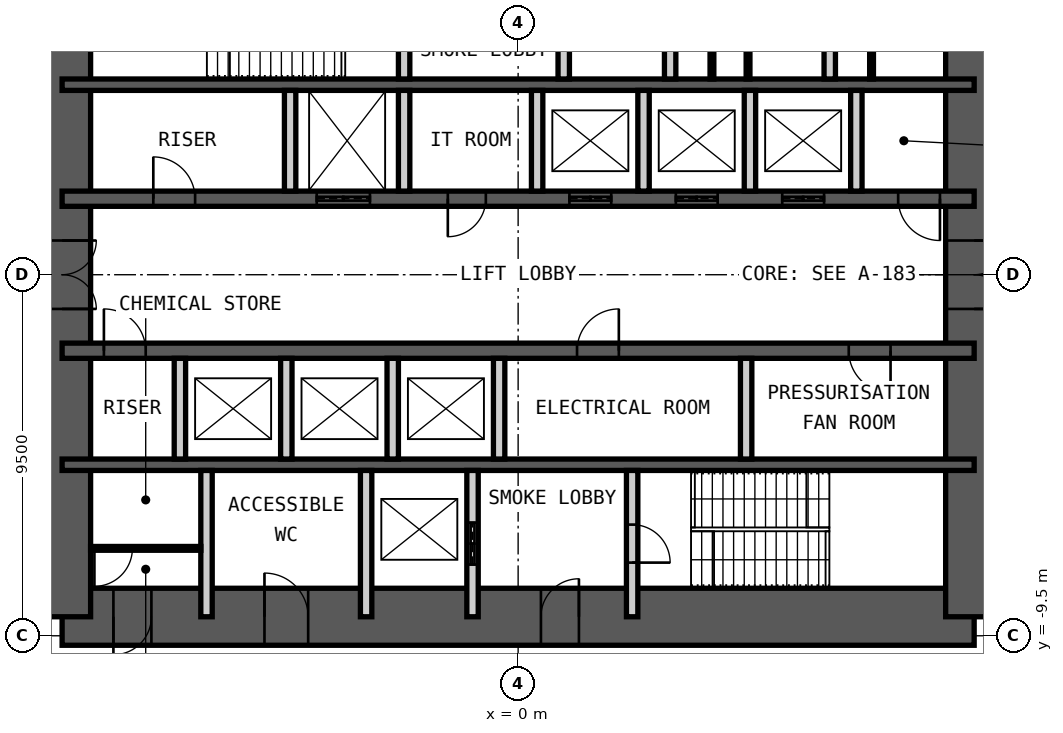
"""IFC4 building model, lengths in metres.
Left out: names, types, materials, properties, quantities, classifications, styles, units other than length and angle.
Written with IfcOpenShell. Run it as: python <this file> out.ifc"""

import sys

from ifc_helpers import new_model, si_unit, direction, frame, frame_2d, origin, place, context, subcontext, project, spatial, rectangle, extrude, element, fill, save


model = new_model("IFC4")
c1 = context("Model", 3, precision=1e-05, world=origin(), true_north=direction((0.0, 1.0)))
c2 = subcontext(c1, "Body", "Model", "MODEL_VIEW")
j1 = project(units=[si_unit("LENGTHUNIT", "METRE"), si_unit("PLANEANGLEUNIT", "RADIAN")], contexts=[c1])
p1 = place(None, origin())
s1 = spatial("IfcSite", under=j1, at=p1, CompositionType="ELEMENT")
p2 = place(p1, origin())
s2 = spatial("IfcBuilding", under=s1, at=p2, CompositionType="ELEMENT")
p3 = place(p2, frame((0.0, 0.0, 32.0)))
s3 = spatial("IfcBuildingStorey", under=s2, at=p3, CompositionType="ELEMENT", Elevation=32.0)
p4 = place(p3, frame((-12.0, -9.0, 0.0), z_axis=(0.0, 0.0, 1.0), x_axis=(1.0, 0.0, 0.0)))
e1 = element("IfcWall", 1, at=p4, inside=s3, PredefinedType="SHEAR", context=c2, shape_type="SweptSolid", body=[
    extrude(rectangle(XDim=24.0, YDim=1.5, at=frame_2d((12.0, 0.0))), origin(), (0.0, 0.0, 1.0), 5.0),
])
p5 = place(p4, frame((1.35, 0.0, 0.0)))
e2 = element("IfcOpeningElement", 2, at=p5, cuts=e1, PredefinedType="OPENING", context=c2, shape_type="SweptSolid", body=[
    extrude(rectangle(XDim=1.0, YDim=2.1, at=frame_2d((0.5, 1.05))), frame((0.0, 0.76, 0.0), z_axis=(0.0, -1.0, 0.0), x_axis=(1.0, 0.0, 0.0)), (0.0, 0.0, 1.0), 1.52),
])
p6 = place(p4, frame((5.325, 0.0, 0.0)))
e3 = element("IfcOpeningElement", 3, at=p6, cuts=e1, PredefinedType="OPENING", context=c2, shape_type="SweptSolid", body=[
    extrude(rectangle(XDim=1.15, YDim=2.1, at=frame_2d((0.575, 1.05))), frame((0.0, 0.76, 0.0), z_axis=(0.0, -1.0, 0.0), x_axis=(1.0, 0.0, 0.0)), (0.0, 0.0, 1.0), 1.52),
])
p7 = place(p4, frame((12.6, 0.0, 0.0)))
e4 = element("IfcOpeningElement", 4, at=p7, cuts=e1, PredefinedType="OPENING", context=c2, shape_type="SweptSolid", body=[
    extrude(rectangle(XDim=1.0, YDim=2.1, at=frame_2d((0.5, 1.05))), frame((0.0, 0.76, 0.0), z_axis=(0.0, -1.0, 0.0), x_axis=(1.0, 0.0, 0.0)), (0.0, 0.0, 1.0), 1.52),
])
p8 = place(p3, frame((12.0, -9.0, 0.0), z_axis=(0.0, 0.0, 1.0), x_axis=(0.0, 1.0, 0.0)))
e5 = element("IfcWall", 5, at=p8, inside=s3, PredefinedType="SHEAR", context=c2, shape_type="SweptSolid", body=[
    extrude(rectangle(XDim=18.0, YDim=1.5, at=frame_2d((9.0, 0.0))), origin(), (0.0, 0.0, 1.0), 5.0),
])
p9 = place(p8, frame((8.1, 0.0, 0.0)))
e6 = element("IfcOpeningElement", 6, at=p9, cuts=e5, PredefinedType="OPENING", context=c2, shape_type="SweptSolid", body=[
    extrude(rectangle(XDim=1.8, YDim=2.1, at=frame_2d((0.9, 1.05))), frame((0.0, 0.76, 0.0), z_axis=(0.0, -1.0, 0.0), x_axis=(1.0, 0.0, 0.0)), (0.0, 0.0, 1.0), 1.52),
])
p10 = place(p3, frame((-12.0, -9.0, 0.0), z_axis=(0.0, 0.0, 1.0), x_axis=(0.0, 1.0, 0.0)))
e7 = element("IfcWall", 7, at=p10, inside=s3, PredefinedType="SHEAR", context=c2, shape_type="SweptSolid", body=[
    extrude(rectangle(XDim=18.0, YDim=1.5, at=frame_2d((9.0, 0.0))), origin(), (0.0, 0.0, 1.0), 5.0),
])
p11 = place(p10, frame((8.1, 0.0, 0.0)))
e8 = element("IfcOpeningElement", 8, at=p11, cuts=e7, PredefinedType="OPENING", context=c2, shape_type="SweptSolid", body=[
    extrude(rectangle(XDim=1.8, YDim=2.1, at=frame_2d((0.9, 1.05))), frame((0.0, 0.76, 0.0), z_axis=(0.0, -1.0, 0.0), x_axis=(1.0, 0.0, 0.0)), (0.0, 0.0, 1.0), 1.52),
])
p12 = place(p3, frame((-12.0, 5.0, 0.0), z_axis=(0.0, 0.0, 1.0), x_axis=(1.0, 0.0, 0.0)))
e9 = element("IfcWall", 9, at=p12, inside=s3, PredefinedType="SHEAR", context=c2, shape_type="SweptSolid", body=[
    extrude(rectangle(XDim=24.0, YDim=0.3, at=frame_2d((12.0, 0.0))), origin(), (0.0, 0.0, 1.0), 5.0),
])
p13 = place(p3, frame((-12.0, 2.0, 0.0), z_axis=(0.0, 0.0, 1.0), x_axis=(1.0, 0.0, 0.0)))
e10 = element("IfcWall", 10, at=p13, inside=s3, PredefinedType="SHEAR", context=c2, shape_type="SweptSolid", body=[
    extrude(rectangle(XDim=24.0, YDim=0.4, at=frame_2d((12.0, 0.0))), origin(), (0.0, 0.0, 1.0), 5.0),
])
p14 = place(p13, frame((2.4, 0.0, 0.0)))
e11 = element("IfcOpeningElement", 11, at=p14, cuts=e10, PredefinedType="OPENING", context=c2, shape_type="SweptSolid", body=[
    extrude(rectangle(XDim=1.1, YDim=2.1, at=frame_2d((0.55, 1.05))), frame((0.0, 0.21, 0.0), z_axis=(0.0, -1.0, 0.0), x_axis=(1.0, 0.0, 0.0)), (0.0, 0.0, 1.0), 0.42),
])
p15 = place(p13, frame((22.0, 0.0, 0.0)))
e12 = element("IfcOpeningElement", 12, at=p15, cuts=e10, PredefinedType="OPENING", context=c2, shape_type="SweptSolid", body=[
    extrude(rectangle(XDim=1.1, YDim=2.1, at=frame_2d((0.55, 1.05))), frame((0.0, 0.21, 0.0), z_axis=(0.0, -1.0, 0.0), x_axis=(1.0, 0.0, 0.0)), (0.0, 0.0, 1.0), 0.42),
])
p16 = place(p13, frame((10.15, 0.0, 0.0)))
e13 = element("IfcOpeningElement", 13, at=p16, cuts=e10, PredefinedType="OPENING", context=c2, shape_type="SweptSolid", body=[
    extrude(rectangle(XDim=1.0, YDim=2.1, at=frame_2d((0.5, 1.05))), frame((0.0, 0.21, 0.0), z_axis=(0.0, -1.0, 0.0), x_axis=(1.0, 0.0, 0.0)), (0.0, 0.0, 1.0), 0.42),
])
p17 = place(p13, frame((6.7, 0.0, 0.0)))
e14 = element("IfcOpeningElement", 14, at=p17, cuts=e10, PredefinedType="OPENING", context=c2, shape_type="SweptSolid", body=[
    extrude(rectangle(XDim=1.4, YDim=2.4, at=frame_2d((0.7, 1.2))), frame((0.0, 0.21, 0.0), z_axis=(0.0, -1.0, 0.0), x_axis=(1.0, 0.0, 0.0)), (0.0, 0.0, 1.0), 0.42),
])
p18 = place(p13, frame((13.35, 0.0, 0.0)))
e15 = element("IfcOpeningElement", 15, at=p18, cuts=e10, PredefinedType="OPENING", context=c2, shape_type="SweptSolid", body=[
    extrude(rectangle(XDim=1.1, YDim=2.4, at=frame_2d((0.55, 1.2))), frame((0.0, 0.21, 0.0), z_axis=(0.0, -1.0, 0.0), x_axis=(1.0, 0.0, 0.0)), (0.0, 0.0, 1.0), 0.42),
])
p19 = place(p13, frame((16.15, 0.0, 0.0)))
e16 = element("IfcOpeningElement", 16, at=p19, cuts=e10, PredefinedType="OPENING", context=c2, shape_type="SweptSolid", body=[
    extrude(rectangle(XDim=1.1, YDim=2.4, at=frame_2d((0.55, 1.2))), frame((0.0, 0.21, 0.0), z_axis=(0.0, -1.0, 0.0), x_axis=(1.0, 0.0, 0.0)), (0.0, 0.0, 1.0), 0.42),
])
p20 = place(p13, frame((18.95, 0.0, 0.0)))
e17 = element("IfcOpeningElement", 17, at=p20, cuts=e10, PredefinedType="OPENING", context=c2, shape_type="SweptSolid", body=[
    extrude(rectangle(XDim=1.1, YDim=2.4, at=frame_2d((0.55, 1.2))), frame((0.0, 0.21, 0.0), z_axis=(0.0, -1.0, 0.0), x_axis=(1.0, 0.0, 0.0)), (0.0, 0.0, 1.0), 0.42),
])
p21 = place(p3, frame((-12.0, -2.0, 0.0), z_axis=(0.0, 0.0, 1.0), x_axis=(1.0, 0.0, 0.0)))
e18 = element("IfcWall", 18, at=p21, inside=s3, PredefinedType="SHEAR", context=c2, shape_type="SweptSolid", body=[
    extrude(rectangle(XDim=24.0, YDim=0.4, at=frame_2d((12.0, 0.0))), origin(), (0.0, 0.0, 1.0), 5.0),
])
p22 = place(p21, frame((1.1, 0.0, 0.0)))
e19 = element("IfcOpeningElement", 19, at=p22, cuts=e18, PredefinedType="OPENING", context=c2, shape_type="SweptSolid", body=[
    extrude(rectangle(XDim=1.1, YDim=2.1, at=frame_2d((0.55, 1.05))), frame((0.0, 0.21, 0.0), z_axis=(0.0, -1.0, 0.0), x_axis=(1.0, 0.0, 0.0)), (0.0, 0.0, 1.0), 0.42),
])
p23 = place(p21, frame((13.55, 0.0, 0.0)))
e20 = element("IfcOpeningElement", 20, at=p23, cuts=e18, PredefinedType="OPENING", context=c2, shape_type="SweptSolid", body=[
    extrude(rectangle(XDim=1.1, YDim=2.1, at=frame_2d((0.55, 1.05))), frame((0.0, 0.21, 0.0), z_axis=(0.0, -1.0, 0.0), x_axis=(1.0, 0.0, 0.0)), (0.0, 0.0, 1.0), 0.42),
])
p24 = place(p21, frame((20.7, 0.0, 0.0)))
e21 = element("IfcOpeningElement", 21, at=p24, cuts=e18, PredefinedType="OPENING", context=c2, shape_type="SweptSolid", body=[
    extrude(rectangle(XDim=1.1, YDim=2.1, at=frame_2d((0.55, 1.05))), frame((0.0, 0.21, 0.0), z_axis=(0.0, -1.0, 0.0), x_axis=(1.0, 0.0, 0.0)), (0.0, 0.0, 1.0), 0.42),
])
p25 = place(p3, frame((-12.0, -5.0, 0.0), z_axis=(0.0, 0.0, 1.0), x_axis=(1.0, 0.0, 0.0)))
e22 = element("IfcWall", 22, at=p25, inside=s3, PredefinedType="SHEAR", context=c2, shape_type="SweptSolid", body=[
    extrude(rectangle(XDim=24.0, YDim=0.3, at=frame_2d((12.0, 0.0))), origin(), (0.0, 0.0, 1.0), 5.0),
])
p26 = place(p3, frame((-3.0, 5.15, 0.0), z_axis=(0.0, 0.0, 1.0), x_axis=(0.0, 1.0, 0.0)))
e23 = element("IfcWall", 23, at=p26, inside=s3, PredefinedType="PARTITIONING", context=c2, shape_type="SweptSolid", body=[
    extrude(rectangle(XDim=3.85, YDim=0.3, at=frame_2d((1.925, 0.0))), origin(), (0.0, 0.0, 1.0), 4.78),
])
p27 = place(p26, frame((1.425, 0.0, 0.0)))
e24 = element("IfcOpeningElement", 24, at=p27, cuts=e23, PredefinedType="OPENING", context=c2, shape_type="SweptSolid", body=[
    extrude(rectangle(XDim=1.0, YDim=2.1, at=frame_2d((0.5, 1.05))), frame((0.0, 0.16, 0.0), z_axis=(0.0, -1.0, 0.0), x_axis=(1.0, 0.0, 0.0)), (0.0, 0.0, 1.0), 0.32),
])
p28 = place(p3, frame((1.2, 5.15, 0.0), z_axis=(0.0, 0.0, 1.0), x_axis=(0.0, 1.0, 0.0)))
e25 = element("IfcWall", 25, at=p28, inside=s3, PredefinedType="PARTITIONING", context=c2, shape_type="SweptSolid", body=[
    extrude(rectangle(XDim=3.85, YDim=0.3, at=frame_2d((1.925, 0.0))), origin(), (0.0, 0.0, 1.0), 4.78),
])
p29 = place(p28, frame((1.375, 0.0, 0.0)))
e26 = element("IfcOpeningElement", 26, at=p29, cuts=e25, PredefinedType="OPENING", context=c2, shape_type="SweptSolid", body=[
    extrude(rectangle(XDim=1.1, YDim=2.4, at=frame_2d((0.55, 1.2))), frame((0.0, 0.16, 0.0), z_axis=(0.0, -1.0, 0.0), x_axis=(1.0, 0.0, 0.0)), (0.0, 0.0, 1.0), 0.32),
])
for number, where, z_axis, x_axis in (
    (27, (4.0, 5.15, 0.0), (0.0, 0.0, 1.0), (0.0, 1.0, 0.0)),
    (28, (8.2, 5.15, 0.0), (0.0, 0.0, 1.0), (0.0, 1.0, 0.0)),
):
    element("IfcWall", number, at=place(p3, frame(where, z_axis=z_axis, x_axis=x_axis)), inside=s3, PredefinedType="PARTITIONING", context=c2, shape_type="SweptSolid", body=[
        extrude(rectangle(XDim=3.85, YDim=0.3, at=frame_2d((1.925, 0.0))), origin(), (0.0, 0.0, 1.0), 4.78),
    ])
for number, where, z_axis, x_axis in (
    (29, (-6.0, 2.2, 0.0), (0.0, 0.0, 1.0), (0.0, 1.0, 0.0)),
    (30, (-3.0, 2.2, 0.0), (0.0, 0.0, 1.0), (0.0, 1.0, 0.0)),
    (31, (0.5, 2.2, 0.0), (0.0, 0.0, 1.0), (0.0, 1.0, 0.0)),
    (32, (3.3, 2.2, 0.0), (0.0, 0.0, 1.0), (0.0, 1.0, 0.0)),
    (33, (6.1, 2.2, 0.0), (0.0, 0.0, 1.0), (0.0, 1.0, 0.0)),
    (34, (8.9, 2.2, 0.0), (0.0, 0.0, 1.0), (0.0, 1.0, 0.0)),
    (35, (-8.9, -4.85, 0.0), (0.0, 0.0, 1.0), (0.0, 1.0, 0.0)),
    (36, (-6.1, -4.85, 0.0), (0.0, 0.0, 1.0), (0.0, 1.0, 0.0)),
    (37, (-3.3, -4.85, 0.0), (0.0, 0.0, 1.0), (0.0, 1.0, 0.0)),
    (38, (-0.5, -4.85, 0.0), (0.0, 0.0, 1.0), (0.0, 1.0, 0.0)),
    (39, (6.0, -4.85, 0.0), (0.0, 0.0, 1.0), (0.0, 1.0, 0.0)),
):
    element("IfcWall", number, at=place(p3, frame(where, z_axis=z_axis, x_axis=x_axis)), inside=s3, PredefinedType="PARTITIONING", context=c2, shape_type="SweptSolid", body=[
        extrude(rectangle(XDim=2.65, YDim=0.3, at=frame_2d((1.325, 0.0))), origin(), (0.0, 0.0, 1.0), 4.78),
    ])
for number, where, z_axis, x_axis in (
    (40, (-8.2, -9.0, 0.0), (0.0, 0.0, 1.0), (0.0, 1.0, 0.0)),
    (41, (-4.0, -9.0, 0.0), (0.0, 0.0, 1.0), (0.0, 1.0, 0.0)),
):
    element("IfcWall", number, at=place(p3, frame(where, z_axis=z_axis, x_axis=x_axis)), inside=s3, PredefinedType="PARTITIONING", context=c2, shape_type="SweptSolid", body=[
        extrude(rectangle(XDim=3.85, YDim=0.3, at=frame_2d((1.925, 0.0))), origin(), (0.0, 0.0, 1.0), 4.78),
    ])
p30 = place(p3, frame((-1.2, -9.0, 0.0), z_axis=(0.0, 0.0, 1.0), x_axis=(0.0, 1.0, 0.0)))
e42 = element("IfcWall", 42, at=p30, inside=s3, PredefinedType="PARTITIONING", context=c2, shape_type="SweptSolid", body=[
    extrude(rectangle(XDim=3.85, YDim=0.3, at=frame_2d((1.925, 0.0))), origin(), (0.0, 0.0, 1.0), 4.78),
])
p31 = place(p30, frame((1.375, 0.0, 0.0)))
e43 = element("IfcOpeningElement", 43, at=p31, cuts=e42, PredefinedType="OPENING", context=c2, shape_type="SweptSolid", body=[
    extrude(rectangle(XDim=1.1, YDim=2.4, at=frame_2d((0.55, 1.2))), frame((0.0, 0.16, 0.0), z_axis=(0.0, -1.0, 0.0), x_axis=(1.0, 0.0, 0.0)), (0.0, 0.0, 1.0), 0.32),
])
p32 = place(p3, frame((3.0, -9.0, 0.0), z_axis=(0.0, 0.0, 1.0), x_axis=(0.0, 1.0, 0.0)))
e44 = element("IfcWall", 44, at=p32, inside=s3, PredefinedType="PARTITIONING", context=c2, shape_type="SweptSolid", body=[
    extrude(rectangle(XDim=3.85, YDim=0.3, at=frame_2d((1.925, 0.0))), origin(), (0.0, 0.0, 1.0), 4.78),
])
p33 = place(p32, frame((1.425, 0.0, 0.0)))
e45 = element("IfcOpeningElement", 45, at=p33, cuts=e44, PredefinedType="OPENING", context=c2, shape_type="SweptSolid", body=[
    extrude(rectangle(XDim=1.0, YDim=2.1, at=frame_2d((0.5, 1.05))), frame((0.0, 0.16, 0.0), z_axis=(0.0, -1.0, 0.0), x_axis=(1.0, 0.0, 0.0)), (0.0, 0.0, 1.0), 0.32),
])
p34 = place(p3, frame((-11.25, -7.2, 0.0), z_axis=(0.0, 0.0, 1.0), x_axis=(1.0, 0.0, 0.0)))
e46 = element("IfcWall", 46, at=p34, inside=s3, PredefinedType="PARTITIONING", context=c2, shape_type="SweptSolid", body=[
    extrude(rectangle(XDim=2.9, YDim=0.1, at=frame_2d((1.45, 0.0))), origin(), (0.0, 0.0, 1.0), 4.78),
])
p35 = place(p34, frame((0.1, 0.0, 0.0)))
e47 = element("IfcOpeningElement", 47, at=p35, cuts=e46, PredefinedType="OPENING", context=c2, shape_type="SweptSolid", body=[
    extrude(rectangle(XDim=1.0, YDim=2.4, at=frame_2d((0.5, 1.2))), frame((0.0, 0.06, 0.0), z_axis=(0.0, -1.0, 0.0), x_axis=(1.0, 0.0, 0.0)), (0.0, 0.0, 1.0), 0.12),
])
for number, where, z_axis, x_axis in (
    (48, (5.1, 5.15, 0.0), (0.0, 0.0, 1.0), (0.0, 1.0, 0.0)),
    (49, (6.05, 5.15, 0.0), (0.0, 0.0, 1.0), (0.0, 1.0, 0.0)),
    (50, (9.3, 5.15, 0.0), (0.0, 0.0, 1.0), (0.0, 1.0, 0.0)),
):
    element("IfcWall", number, at=place(p3, frame(where, z_axis=z_axis, x_axis=x_axis)), inside=s3, PredefinedType="PARTITIONING", context=c2, shape_type="SweptSolid", body=[
        extrude(rectangle(XDim=1.5, YDim=0.1, at=frame_2d((0.75, 0.0))), origin(), (0.0, 0.0, 1.0), 2.1),
    ])
p36 = place(p5, origin())
e51 = element("IfcDoor", 51, at=p36, inside=s3, OperationType="SINGLE_SWING_LEFT", PredefinedType="DOOR", context=c2, shape_type="SweptSolid", body=[
    extrude(rectangle(XDim=1.0, YDim=2.1, at=frame_2d((0.5, 1.05))), frame((0.0, 0.025, 0.0), z_axis=(0.0, -1.0, 0.0), x_axis=(1.0, 0.0, 0.0)), (0.0, 0.0, 1.0), 0.05),
])
fill(e2, e51)
p37 = place(p6, origin())
e52 = element("IfcDoor", 52, at=p37, inside=s3, OperationType="SINGLE_SWING_RIGHT", PredefinedType="DOOR", context=c2, shape_type="SweptSolid", body=[
    extrude(rectangle(XDim=1.15, YDim=2.1, at=frame_2d((0.575, 1.05))), frame((0.0, 0.025, 0.0), z_axis=(0.0, -1.0, 0.0), x_axis=(1.0, 0.0, 0.0)), (0.0, 0.0, 1.0), 0.05),
])
fill(e3, e52)
p38 = place(p7, origin())
e53 = element("IfcDoor", 53, at=p38, inside=s3, OperationType="SINGLE_SWING_LEFT", PredefinedType="DOOR", context=c2, shape_type="SweptSolid", body=[
    extrude(rectangle(XDim=1.0, YDim=2.1, at=frame_2d((0.5, 1.05))), frame((0.0, 0.025, 0.0), z_axis=(0.0, -1.0, 0.0), x_axis=(1.0, 0.0, 0.0)), (0.0, 0.0, 1.0), 0.05),
])
fill(e4, e53)
p39 = place(p33, origin())
e54 = element("IfcDoor", 54, at=p39, inside=s3, OperationType="SINGLE_SWING_LEFT", PredefinedType="DOOR", context=c2, shape_type="SweptSolid", body=[
    extrude(rectangle(XDim=1.0, YDim=2.1, at=frame_2d((0.5, 1.05))), frame((0.0, 0.025, 0.0), z_axis=(0.0, -1.0, 0.0), x_axis=(1.0, 0.0, 0.0)), (0.0, 0.0, 1.0), 0.05),
])
fill(e45, e54)
p40 = place(p14, origin())
e55 = element("IfcDoor", 55, at=p40, inside=s3, OperationType="SINGLE_SWING_RIGHT", PredefinedType="DOOR", context=c2, shape_type="SweptSolid", body=[
    extrude(rectangle(XDim=1.1, YDim=2.1, at=frame_2d((0.55, 1.05))), frame((0.0, 0.025, 0.0), z_axis=(0.0, -1.0, 0.0), x_axis=(1.0, 0.0, 0.0)), (0.0, 0.0, 1.0), 0.05),
])
fill(e11, e55)
p41 = place(p22, origin())
e56 = element("IfcDoor", 56, at=p41, inside=s3, OperationType="SINGLE_SWING_RIGHT", PredefinedType="DOOR", context=c2, shape_type="SweptSolid", body=[
    extrude(rectangle(XDim=1.1, YDim=2.1, at=frame_2d((0.55, 1.05))), frame((0.0, 0.025, 0.0), z_axis=(0.0, -1.0, 0.0), x_axis=(1.0, 0.0, 0.0)), (0.0, 0.0, 1.0), 0.05),
])
fill(e19, e56)
p42 = place(p15, origin())
e57 = element("IfcDoor", 57, at=p42, inside=s3, OperationType="SINGLE_SWING_RIGHT", PredefinedType="DOOR", context=c2, shape_type="SweptSolid", body=[
    extrude(rectangle(XDim=1.1, YDim=2.1, at=frame_2d((0.55, 1.05))), frame((0.0, 0.025, 0.0), z_axis=(0.0, -1.0, 0.0), x_axis=(1.0, 0.0, 0.0)), (0.0, 0.0, 1.0), 0.05),
])
fill(e12, e57)
p43 = place(p16, origin())
e58 = element("IfcDoor", 58, at=p43, inside=s3, OperationType="SINGLE_SWING_LEFT", PredefinedType="DOOR", context=c2, shape_type="SweptSolid", body=[
    extrude(rectangle(XDim=1.0, YDim=2.1, at=frame_2d((0.5, 1.05))), frame((0.0, 0.025, 0.0), z_axis=(0.0, -1.0, 0.0), x_axis=(1.0, 0.0, 0.0)), (0.0, 0.0, 1.0), 0.05),
])
fill(e13, e58)
p44 = place(p23, origin())
e59 = element("IfcDoor", 59, at=p44, inside=s3, OperationType="SINGLE_SWING_LEFT", PredefinedType="DOOR", context=c2, shape_type="SweptSolid", body=[
    extrude(rectangle(XDim=1.1, YDim=2.1, at=frame_2d((0.55, 1.05))), frame((0.0, 0.025, 0.0), z_axis=(0.0, -1.0, 0.0), x_axis=(1.0, 0.0, 0.0)), (0.0, 0.0, 1.0), 0.05),
])
fill(e20, e59)
p45 = place(p24, origin())
e60 = element("IfcDoor", 60, at=p45, inside=s3, OperationType="SINGLE_SWING_RIGHT", PredefinedType="DOOR", context=c2, shape_type="SweptSolid", body=[
    extrude(rectangle(XDim=1.1, YDim=2.1, at=frame_2d((0.55, 1.05))), frame((0.0, 0.025, 0.0), z_axis=(0.0, -1.0, 0.0), x_axis=(1.0, 0.0, 0.0)), (0.0, 0.0, 1.0), 0.05),
])
fill(e21, e60)
p46 = place(p9, origin())
e61 = element("IfcDoor", 61, at=p46, inside=s3, OperationType="DOUBLE_DOOR_DOUBLE_SWING", PredefinedType="DOOR", context=c2, shape_type="SweptSolid", body=[
    extrude(rectangle(XDim=1.8, YDim=2.1, at=frame_2d((0.9, 1.05))), frame((0.0, 0.025, 0.0), z_axis=(0.0, -1.0, 0.0), x_axis=(1.0, 0.0, 0.0)), (0.0, 0.0, 1.0), 0.05),
])
fill(e6, e61)
p47 = place(p11, origin())
e62 = element("IfcDoor", 62, at=p47, inside=s3, OperationType="DOUBLE_DOOR_DOUBLE_SWING", PredefinedType="DOOR", context=c2, shape_type="SweptSolid", body=[
    extrude(rectangle(XDim=1.8, YDim=2.1, at=frame_2d((0.9, 1.05))), frame((0.0, 0.025, 0.0), z_axis=(0.0, -1.0, 0.0), x_axis=(1.0, 0.0, 0.0)), (0.0, 0.0, 1.0), 0.05),
])
fill(e8, e62)
p48 = place(p31, origin())
e63 = element("IfcDoor", 63, at=p48, inside=s3, OperationType="DOUBLE_DOOR_SLIDING", PredefinedType="DOOR", context=c2, shape_type="SweptSolid", body=[
    extrude(rectangle(XDim=1.1, YDim=2.4, at=frame_2d((0.55, 1.2))), frame((0.0, 0.025, 0.0), z_axis=(0.0, -1.0, 0.0), x_axis=(1.0, 0.0, 0.0)), (0.0, 0.0, 1.0), 0.05),
])
fill(e43, e63)
p49 = place(p17, origin())
e64 = element("IfcDoor", 64, at=p49, inside=s3, OperationType="DOUBLE_DOOR_SLIDING", PredefinedType="DOOR", context=c2, shape_type="SweptSolid", body=[
    extrude(rectangle(XDim=1.4, YDim=2.4, at=frame_2d((0.7, 1.2))), frame((0.0, 0.025, 0.0), z_axis=(0.0, -1.0, 0.0), x_axis=(1.0, 0.0, 0.0)), (0.0, 0.0, 1.0), 0.05),
])
fill(e14, e64)
p50 = place(p18, origin())
e65 = element("IfcDoor", 65, at=p50, inside=s3, OperationType="DOUBLE_DOOR_SLIDING", PredefinedType="DOOR", context=c2, shape_type="SweptSolid", body=[
    extrude(rectangle(XDim=1.1, YDim=2.4, at=frame_2d((0.55, 1.2))), frame((0.0, 0.025, 0.0), z_axis=(0.0, -1.0, 0.0), x_axis=(1.0, 0.0, 0.0)), (0.0, 0.0, 1.0), 0.05),
])
fill(e15, e65)
p51 = place(p19, origin())
e66 = element("IfcDoor", 66, at=p51, inside=s3, OperationType="DOUBLE_DOOR_SLIDING", PredefinedType="DOOR", context=c2, shape_type="SweptSolid", body=[
    extrude(rectangle(XDim=1.1, YDim=2.4, at=frame_2d((0.55, 1.2))), frame((0.0, 0.025, 0.0), z_axis=(0.0, -1.0, 0.0), x_axis=(1.0, 0.0, 0.0)), (0.0, 0.0, 1.0), 0.05),
])
fill(e16, e66)
p52 = place(p20, origin())
e67 = element("IfcDoor", 67, at=p52, inside=s3, OperationType="DOUBLE_DOOR_SLIDING", PredefinedType="DOOR", context=c2, shape_type="SweptSolid", body=[
    extrude(rectangle(XDim=1.1, YDim=2.4, at=frame_2d((0.55, 1.2))), frame((0.0, 0.025, 0.0), z_axis=(0.0, -1.0, 0.0), x_axis=(1.0, 0.0, 0.0)), (0.0, 0.0, 1.0), 0.05),
])
fill(e17, e67)
p53 = place(p35, origin())
e68 = element("IfcDoor", 68, at=p53, inside=s3, OperationType="SINGLE_SWING_LEFT", PredefinedType="DOOR", context=c2, shape_type="SweptSolid", body=[
    extrude(rectangle(XDim=1.0, YDim=2.4, at=frame_2d((0.5, 1.2))), frame((0.0, 0.025, 0.0), z_axis=(0.0, -1.0, 0.0), x_axis=(1.0, 0.0, 0.0)), (0.0, 0.0, 1.0), 0.05),
])
fill(e47, e68)
save(model, sys.argv[1])
